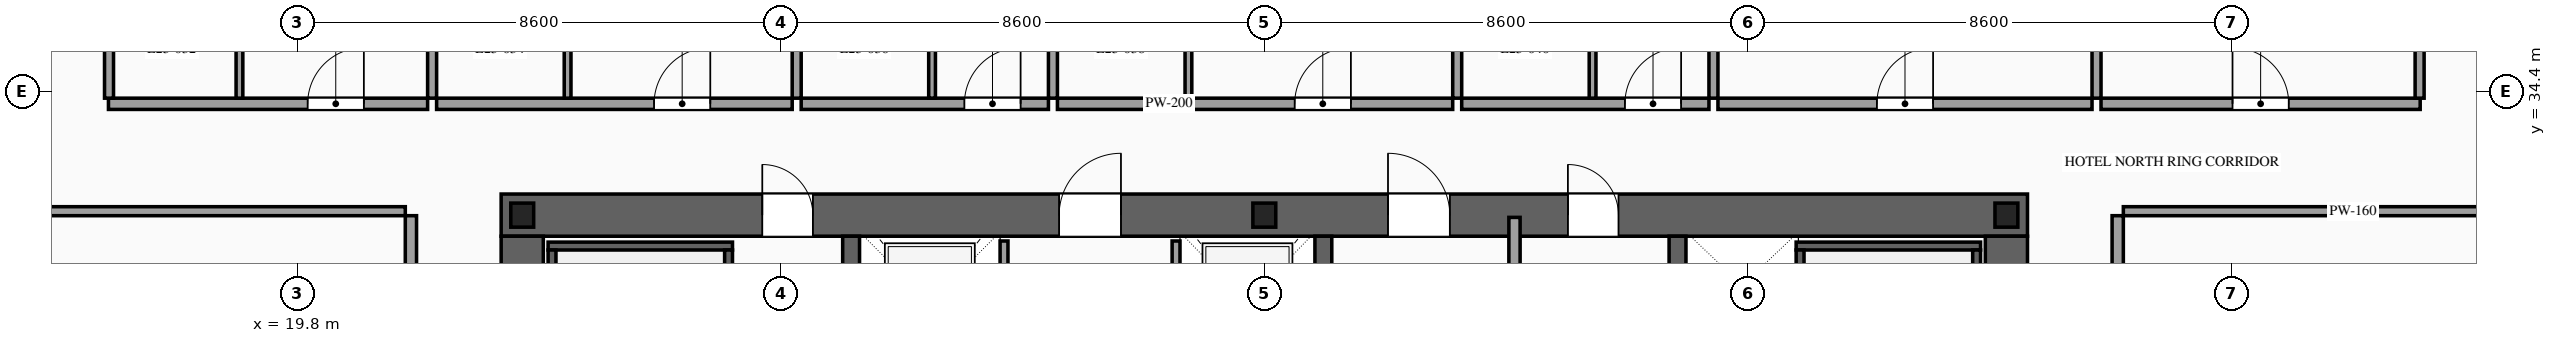
"""IFC4 building model, lengths in metres.
Left out: names, types, materials, properties, quantities, classifications, styles, units other than length and angle.
Written with IfcOpenShell. Run it as: python <this file> out.ifc"""

import sys

from ifc_helpers import new_model, si_unit, direction, frame, frame_2d, origin, origin_2d, place, context, subcontext, project, spatial, rectangle, i_section, extrude, source, transform, mapped, element, fill, save


model = new_model("IFC4")
c1 = context("Model", 3, precision=1e-05, world=origin(), true_north=direction((0.0, 1.0)))
c2 = subcontext(c1, "Body", "Model", "MODEL_VIEW")
j1 = project(units=[si_unit("LENGTHUNIT", "METRE"), si_unit("PLANEANGLEUNIT", "RADIAN")], contexts=[c1])
p1 = place(None, origin())
s1 = spatial("IfcSite", under=j1, at=p1, CompositionType="ELEMENT")
p2 = place(p1, origin())
s2 = spatial("IfcBuilding", under=s1, at=p2, CompositionType="ELEMENT")
p3 = place(p2, frame((0.0, 0.0, 97.4)))
s3 = spatial("IfcBuildingStorey", under=s2, at=p3, CompositionType="ELEMENT", Elevation=97.4)
p4 = place(p3, frame((23.425, 32.2, 0.0), z_axis=(0.0, 0.0, 1.0), x_axis=(1.0, 0.0, 0.0)))
e1 = element("IfcWall", 1, at=p4, inside=s3, PredefinedType="SHEAR", context=c2, shape_type="SweptSolid", body=[
    extrude(rectangle(XDim=27.15, YDim=0.75, at=frame_2d((13.575, 0.0))), origin(), (0.0, 0.0, 1.0), 3.6),
])
p5 = place(p4, frame((4.645, 0.0, 0.0)))
e2 = element("IfcOpeningElement", 2, at=p5, cuts=e1, PredefinedType="OPENING", context=c2, shape_type="SweptSolid", body=[
    extrude(rectangle(XDim=0.9, YDim=2.15, at=frame_2d((0.45, 1.075))), frame((0.0, 0.39, 0.0), z_axis=(0.0, -1.0, 0.0), x_axis=(1.0, 0.0, 0.0)), (0.0, 0.0, 1.0), 0.78),
])
p6 = place(p4, frame((9.925, 0.0, 0.0)))
e3 = element("IfcOpeningElement", 3, at=p6, cuts=e1, PredefinedType="OPENING", context=c2, shape_type="SweptSolid", body=[
    extrude(rectangle(XDim=1.1, YDim=2.2, at=frame_2d((0.55, 1.1))), frame((0.0, 0.39, 0.0), z_axis=(0.0, -1.0, 0.0), x_axis=(1.0, 0.0, 0.0)), (0.0, 0.0, 1.0), 0.78),
])
p7 = place(p4, frame((15.775, 0.0, 0.0)))
e4 = element("IfcOpeningElement", 4, at=p7, cuts=e1, PredefinedType="OPENING", context=c2, shape_type="SweptSolid", body=[
    extrude(rectangle(XDim=1.1, YDim=2.2, at=frame_2d((0.55, 1.1))), frame((0.0, 0.39, 0.0), z_axis=(0.0, -1.0, 0.0), x_axis=(1.0, 0.0, 0.0)), (0.0, 0.0, 1.0), 0.78),
])
p8 = place(p4, frame((18.975, 0.0, 0.0)))
e5 = element("IfcOpeningElement", 5, at=p8, cuts=e1, PredefinedType="OPENING", context=c2, shape_type="SweptSolid", body=[
    extrude(rectangle(XDim=0.9, YDim=2.15, at=frame_2d((0.45, 1.075))), frame((0.0, 0.39, 0.0), z_axis=(0.0, -1.0, 0.0), x_axis=(1.0, 0.0, 0.0)), (0.0, 0.0, 1.0), 0.78),
])
m1 = source(origin(), c2, "Body", "SweptSolid", [
    extrude(rectangle(XDim=12.05, YDim=0.75, at=frame_2d((6.025, 0.0))), origin(), (0.0, 0.0, 1.0), 3.6),
])
for number, where, z_axis, x_axis in (
    (6, (23.8, 19.775, 0.0), (0.0, 0.0, 1.0), (0.0, 1.0, 0.0)),
    (7, (50.2, 19.775, 0.0), (0.0, 0.0, 1.0), (0.0, 1.0, 0.0)),
):
    element("IfcWall", number, at=place(p3, frame(where, z_axis=z_axis, x_axis=x_axis)), inside=s3, PredefinedType="SHEAR", context=c2, shape_type="MappedRepresentation", body=[
        mapped(m1, transform((0.0, 0.0, 0.0), scale=1.0)),
    ])
m2 = source(origin(), c2, "Body", "SweptSolid", [
    extrude(rectangle(XDim=12.05, YDim=0.3, at=frame_2d((6.025, 0.0))), origin(), (0.0, 0.0, 1.0), 3.6),
])
for number, where, z_axis, x_axis in (
    (8, (29.65, 19.775, 0.0), (0.0, 0.0, 1.0), (0.0, 1.0, 0.0)),
    (9, (38.05, 19.775, 0.0), (0.0, 0.0, 1.0), (0.0, 1.0, 0.0)),
    (10, (44.35, 19.775, 0.0), (0.0, 0.0, 1.0), (0.0, 1.0, 0.0)),
):
    element("IfcWall", number, at=place(p3, frame(where, z_axis=z_axis, x_axis=x_axis)), inside=s3, PredefinedType="SOLIDWALL", context=c2, shape_type="MappedRepresentation", body=[
        mapped(m2, transform((0.0, 0.0, 0.0), scale=1.0)),
    ])
m3 = source(origin(), c2, "Body", "SweptSolid", [
    extrude(i_section(OverallWidth=0.407, OverallDepth=0.428, WebThickness=0.02, FlangeThickness=0.035, at=origin_2d()), origin(), (0.0, 0.0, 1.0), 3.6),
])
for number, where, z_axis, x_axis in (
    (11, (23.8, 32.2, 0.0), (0.0, 0.0, 1.0), (1.0, 0.0, 0.0)),
    (12, (37.0, 32.2, 0.0), (0.0, 0.0, 1.0), (1.0, 0.0, 0.0)),
    (13, (50.2, 32.2, 0.0), (0.0, 0.0, 1.0), (1.0, 0.0, 0.0)),
):
    element("IfcColumn", number, at=place(p3, frame(where, z_axis=z_axis, x_axis=x_axis)), inside=s3, PredefinedType="COLUMN", context=c2, shape_type="MappedRepresentation", body=[
        mapped(m3, transform((0.0, 0.0, 0.0), scale=1.0)),
    ])
p9 = place(p3, frame((32.37, 29.4, 0.0), z_axis=(0.0, 0.0, 1.0), x_axis=(0.0, 1.0, 0.0)))
e14 = element("IfcWall", 14, at=p9, inside=s3, PredefinedType="SOLIDWALL", context=c2, shape_type="SweptSolid", body=[
    extrude(rectangle(XDim=2.34, YDim=0.14, at=frame_2d((1.17, 0.0))), origin(), (0.0, 0.0, 1.0), 3.38),
])
p10 = place(p9, frame((0.62, 0.0, 0.0)))
e15 = element("IfcOpeningElement", 15, at=p10, cuts=e14, PredefinedType="OPENING", context=c2, shape_type="SweptSolid", body=[
    extrude(rectangle(XDim=1.1, YDim=2.2, at=frame_2d((0.55, 1.1))), frame((0.0, 0.085, 0.0), z_axis=(0.0, -1.0, 0.0), x_axis=(1.0, 0.0, 0.0)), (0.0, 0.0, 1.0), 0.17),
])
p11 = place(p3, frame((35.43, 29.4, 0.0), z_axis=(0.0, 0.0, 1.0), x_axis=(0.0, 1.0, 0.0)))
e16 = element("IfcWall", 16, at=p11, inside=s3, PredefinedType="SOLIDWALL", context=c2, shape_type="SweptSolid", body=[
    extrude(rectangle(XDim=2.34, YDim=0.14, at=frame_2d((1.17, 0.0))), origin(), (0.0, 0.0, 1.0), 3.38),
])
p12 = place(p11, frame((0.62, 0.0, 0.0)))
e17 = element("IfcOpeningElement", 17, at=p12, cuts=e16, PredefinedType="OPENING", context=c2, shape_type="SweptSolid", body=[
    extrude(rectangle(XDim=1.1, YDim=2.2, at=frame_2d((0.55, 1.1))), frame((0.0, 0.085, 0.0), z_axis=(0.0, -1.0, 0.0), x_axis=(1.0, 0.0, 0.0)), (0.0, 0.0, 1.0), 0.17),
])
m4 = source(origin(), c2, "Body", "SweptSolid", [
    extrude(rectangle(XDim=3.28, YDim=0.14, at=frame_2d((1.64, 0.0))), origin(), (0.0, 0.0, 1.0), 3.38),
])
p13 = place(p3, frame((24.26, 31.65, 0.0), z_axis=(0.0, 0.0, 1.0), x_axis=(1.0, 0.0, 0.0)))
e18 = element("IfcWall", 18, at=p13, inside=s3, PredefinedType="SOLIDWALL", context=c2, shape_type="MappedRepresentation", body=[
    mapped(m4, transform((0.0, 0.0, 0.0), scale=1.0)),
])
m5 = source(origin(), c2, "Body", "SweptSolid", [
    extrude(rectangle(XDim=8.94, YDim=0.14, at=frame_2d((4.47, 0.0))), origin(), (0.0, 0.0, 1.0), 3.38),
])
for number, where, z_axis, x_axis in (
    (19, (24.33, 22.64, 0.0), (0.0, 0.0, 1.0), (0.0, 1.0, 0.0)),
    (20, (27.47, 22.64, 0.0), (0.0, 0.0, 1.0), (0.0, 1.0, 0.0)),
):
    element("IfcWall", number, at=place(p3, frame(where, z_axis=z_axis, x_axis=x_axis)), inside=s3, PredefinedType="SOLIDWALL", context=c2, shape_type="MappedRepresentation", body=[
        mapped(m5, transform((0.0, 0.0, 0.0), scale=1.0)),
    ])
p14 = place(p3, frame((46.46, 31.65, 0.0), z_axis=(0.0, 0.0, 1.0), x_axis=(1.0, 0.0, 0.0)))
e21 = element("IfcWall", 21, at=p14, inside=s3, PredefinedType="SOLIDWALL", context=c2, shape_type="MappedRepresentation", body=[
    mapped(m4, transform((0.0, 0.0, 0.0), scale=1.0)),
])
for number, where, z_axis, x_axis in (
    (22, (46.53, 22.64, 0.0), (0.0, 0.0, 1.0), (0.0, 1.0, 0.0)),
    (23, (49.67, 22.64, 0.0), (0.0, 0.0, 1.0), (0.0, 1.0, 0.0)),
):
    element("IfcWall", number, at=place(p3, frame(where, z_axis=z_axis, x_axis=x_axis)), inside=s3, PredefinedType="SOLIDWALL", context=c2, shape_type="MappedRepresentation", body=[
        mapped(m5, transform((0.0, 0.0, 0.0), scale=1.0)),
    ])
m6 = source(origin(), c2, "Body", "SweptSolid", [
    extrude(rectangle(XDim=5.96, YDim=0.2, at=frame_2d((2.98, 0.0))), origin(), (0.0, 0.0, 1.0), 3.38),
])
p15 = place(p3, frame((41.45, 26.2, 0.0), z_axis=(0.0, 0.0, 1.0), x_axis=(0.0, 1.0, 0.0)))
e24 = element("IfcWall", 24, at=p15, inside=s3, PredefinedType="PARTITIONING", context=c2, shape_type="MappedRepresentation", body=[
    mapped(m6, transform((0.0, 0.0, 0.0), scale=1.0)),
])
p16 = place(p3, frame((16.44, 34.18, 0.0), z_axis=(0.0, 0.0, 1.0), x_axis=(1.0, 0.0, 0.0)))
e25 = element("IfcWall", 25, at=p16, inside=s3, PredefinedType="PARTITIONING", context=c2, shape_type="SweptSolid", body=[
    extrude(rectangle(XDim=5.677, YDim=0.2, at=frame_2d((2.838, 0.0))), origin(), (0.0, 0.0, 1.0), 3.38),
])
p17 = place(p16, frame((3.543, 0.0, 0.0)))
e26 = element("IfcOpeningElement", 26, at=p17, cuts=e25, PredefinedType="OPENING", context=c2, shape_type="SweptSolid", body=[
    extrude(rectangle(XDim=1.0, YDim=2.2, at=frame_2d((0.5, 1.1))), frame((0.0, 0.115, 0.0), z_axis=(0.0, -1.0, 0.0), x_axis=(1.0, 0.0, 0.0)), (0.0, 0.0, 1.0), 0.23),
])
m7 = source(origin(), c2, "Body", "SweptSolid", [
    extrude(rectangle(XDim=14.97, YDim=0.16, at=frame_2d((7.485, 0.0))), origin(), (0.0, 0.0, 1.0), 3.38),
])
p18 = place(p3, frame((22.197, 34.28, 0.0), z_axis=(0.0, 0.0, 1.0), x_axis=(0.0, 1.0, 0.0)))
e27 = element("IfcWall", 27, at=p18, inside=s3, PredefinedType="PARTITIONING", context=c2, shape_type="MappedRepresentation", body=[
    mapped(m7, transform((0.0, 0.0, 0.0), scale=1.0)),
])
m8 = source(origin(), c2, "Body", "SweptSolid", [
    extrude(rectangle(XDim=2.42, YDim=0.12, at=frame_2d((1.21, 0.0))), origin(), (0.0, 0.0, 1.0), 3.38),
])
p19 = place(p3, frame((18.77, 34.28, 0.0), z_axis=(0.0, 0.0, 1.0), x_axis=(0.0, 1.0, 0.0)))
e28 = element("IfcWall", 28, at=p19, inside=s3, PredefinedType="PARTITIONING", context=c2, shape_type="MappedRepresentation", body=[
    mapped(m8, transform((0.0, 0.0, 0.0), scale=1.0)),
])
p20 = place(p3, frame((22.277, 34.18, 0.0), z_axis=(0.0, 0.0, 1.0), x_axis=(1.0, 0.0, 0.0)))
e29 = element("IfcWall", 29, at=p20, inside=s3, PredefinedType="PARTITIONING", context=c2, shape_type="SweptSolid", body=[
    extrude(rectangle(XDim=6.325, YDim=0.2, at=frame_2d((3.163, 0.0))), origin(), (0.0, 0.0, 1.0), 3.38),
])
p21 = place(p20, frame((3.868, 0.0, 0.0)))
e30 = element("IfcOpeningElement", 30, at=p21, cuts=e29, PredefinedType="OPENING", context=c2, shape_type="SweptSolid", body=[
    extrude(rectangle(XDim=1.0, YDim=2.2, at=frame_2d((0.5, 1.1))), frame((0.0, 0.115, 0.0), z_axis=(0.0, -1.0, 0.0), x_axis=(1.0, 0.0, 0.0)), (0.0, 0.0, 1.0), 0.23),
])
p22 = place(p3, frame((28.682, 34.28, 0.0), z_axis=(0.0, 0.0, 1.0), x_axis=(0.0, 1.0, 0.0)))
e31 = element("IfcWall", 31, at=p22, inside=s3, PredefinedType="PARTITIONING", context=c2, shape_type="MappedRepresentation", body=[
    mapped(m7, transform((0.0, 0.0, 0.0), scale=1.0)),
])
p23 = place(p3, frame((24.607, 34.28, 0.0), z_axis=(0.0, 0.0, 1.0), x_axis=(0.0, 1.0, 0.0)))
e32 = element("IfcWall", 32, at=p23, inside=s3, PredefinedType="PARTITIONING", context=c2, shape_type="MappedRepresentation", body=[
    mapped(m8, transform((0.0, 0.0, 0.0), scale=1.0)),
])
p24 = place(p3, frame((28.762, 34.18, 0.0), z_axis=(0.0, 0.0, 1.0), x_axis=(1.0, 0.0, 0.0)))
e33 = element("IfcWall", 33, at=p24, inside=s3, PredefinedType="PARTITIONING", context=c2, shape_type="SweptSolid", body=[
    extrude(rectangle(XDim=4.398, YDim=0.2, at=frame_2d((2.199, 0.0))), origin(), (0.0, 0.0, 1.0), 3.38),
])
p25 = place(p24, frame((2.903, 0.0, 0.0)))
e34 = element("IfcOpeningElement", 34, at=p25, cuts=e33, PredefinedType="OPENING", context=c2, shape_type="SweptSolid", body=[
    extrude(rectangle(XDim=1.0, YDim=2.2, at=frame_2d((0.5, 1.1))), frame((0.0, 0.115, 0.0), z_axis=(0.0, -1.0, 0.0), x_axis=(1.0, 0.0, 0.0)), (0.0, 0.0, 1.0), 0.23),
])
p26 = place(p3, frame((33.24, 34.28, 0.0), z_axis=(0.0, 0.0, 1.0), x_axis=(0.0, 1.0, 0.0)))
e35 = element("IfcWall", 35, at=p26, inside=s3, PredefinedType="PARTITIONING", context=c2, shape_type="MappedRepresentation", body=[
    mapped(m7, transform((0.0, 0.0, 0.0), scale=1.0)),
])
p27 = place(p3, frame((31.09, 34.28, 0.0), z_axis=(0.0, 0.0, 1.0), x_axis=(0.0, 1.0, 0.0)))
e36 = element("IfcWall", 36, at=p27, inside=s3, PredefinedType="PARTITIONING", context=c2, shape_type="MappedRepresentation", body=[
    mapped(m8, transform((0.0, 0.0, 0.0), scale=1.0)),
])
p28 = place(p3, frame((33.32, 34.18, 0.0), z_axis=(0.0, 0.0, 1.0), x_axis=(1.0, 0.0, 0.0)))
e37 = element("IfcWall", 37, at=p28, inside=s3, PredefinedType="PARTITIONING", context=c2, shape_type="SweptSolid", body=[
    extrude(rectangle(XDim=7.031, YDim=0.2, at=frame_2d((3.516, 0.0))), origin(), (0.0, 0.0, 1.0), 3.38),
])
p29 = place(p28, frame((4.22, 0.0, 0.0)))
e38 = element("IfcOpeningElement", 38, at=p29, cuts=e37, PredefinedType="OPENING", context=c2, shape_type="SweptSolid", body=[
    extrude(rectangle(XDim=1.0, YDim=2.2, at=frame_2d((0.5, 1.1))), frame((0.0, 0.115, 0.0), z_axis=(0.0, -1.0, 0.0), x_axis=(1.0, 0.0, 0.0)), (0.0, 0.0, 1.0), 0.23),
])
p30 = place(p3, frame((40.431, 34.28, 0.0), z_axis=(0.0, 0.0, 1.0), x_axis=(0.0, 1.0, 0.0)))
e39 = element("IfcWall", 39, at=p30, inside=s3, PredefinedType="PARTITIONING", context=c2, shape_type="MappedRepresentation", body=[
    mapped(m7, transform((0.0, 0.0, 0.0), scale=1.0)),
])
p31 = place(p3, frame((35.65, 34.28, 0.0), z_axis=(0.0, 0.0, 1.0), x_axis=(0.0, 1.0, 0.0)))
e40 = element("IfcWall", 40, at=p31, inside=s3, PredefinedType="PARTITIONING", context=c2, shape_type="MappedRepresentation", body=[
    mapped(m8, transform((0.0, 0.0, 0.0), scale=1.0)),
])
p32 = place(p3, frame((40.511, 34.18, 0.0), z_axis=(0.0, 0.0, 1.0), x_axis=(1.0, 0.0, 0.0)))
e41 = element("IfcWall", 41, at=p32, inside=s3, PredefinedType="PARTITIONING", context=c2, shape_type="SweptSolid", body=[
    extrude(rectangle(XDim=4.398, YDim=0.2, at=frame_2d((2.199, 0.0))), origin(), (0.0, 0.0, 1.0), 3.38),
])
p33 = place(p32, frame((2.903, 0.0, 0.0)))
e42 = element("IfcOpeningElement", 42, at=p33, cuts=e41, PredefinedType="OPENING", context=c2, shape_type="SweptSolid", body=[
    extrude(rectangle(XDim=1.0, YDim=2.2, at=frame_2d((0.5, 1.1))), frame((0.0, 0.115, 0.0), z_axis=(0.0, -1.0, 0.0), x_axis=(1.0, 0.0, 0.0)), (0.0, 0.0, 1.0), 0.23),
])
p34 = place(p3, frame((44.989, 34.28, 0.0), z_axis=(0.0, 0.0, 1.0), x_axis=(0.0, 1.0, 0.0)))
e43 = element("IfcWall", 43, at=p34, inside=s3, PredefinedType="PARTITIONING", context=c2, shape_type="MappedRepresentation", body=[
    mapped(m7, transform((0.0, 0.0, 0.0), scale=1.0)),
])
p35 = place(p3, frame((42.839, 34.28, 0.0), z_axis=(0.0, 0.0, 1.0), x_axis=(0.0, 1.0, 0.0)))
e44 = element("IfcWall", 44, at=p35, inside=s3, PredefinedType="PARTITIONING", context=c2, shape_type="MappedRepresentation", body=[
    mapped(m8, transform((0.0, 0.0, 0.0), scale=1.0)),
])
p36 = place(p3, frame((45.069, 34.18, 0.0), z_axis=(0.0, 0.0, 1.0), x_axis=(1.0, 0.0, 0.0)))
e45 = element("IfcWall", 45, at=p36, inside=s3, PredefinedType="PARTITIONING", context=c2, shape_type="SweptSolid", body=[
    extrude(rectangle(XDim=6.654, YDim=0.2, at=frame_2d((3.327, 0.0))), origin(), (0.0, 0.0, 1.0), 3.38),
])
p37 = place(p36, frame((2.827, 0.0, 0.0)))
e46 = element("IfcOpeningElement", 46, at=p37, cuts=e45, PredefinedType="OPENING", context=c2, shape_type="SweptSolid", body=[
    extrude(rectangle(XDim=1.0, YDim=2.2, at=frame_2d((0.5, 1.1))), frame((0.0, 0.115, 0.0), z_axis=(0.0, -1.0, 0.0), x_axis=(1.0, 0.0, 0.0)), (0.0, 0.0, 1.0), 0.23),
])
p38 = place(p3, frame((51.803, 34.28, 0.0), z_axis=(0.0, 0.0, 1.0), x_axis=(0.0, 1.0, 0.0)))
e47 = element("IfcWall", 47, at=p38, inside=s3, PredefinedType="PARTITIONING", context=c2, shape_type="MappedRepresentation", body=[
    mapped(m7, transform((0.0, 0.0, 0.0), scale=1.0)),
])
p39 = place(p3, frame((51.883, 34.18, 0.0), z_axis=(0.0, 0.0, 1.0), x_axis=(1.0, 0.0, 0.0)))
e48 = element("IfcWall", 48, at=p39, inside=s3, PredefinedType="PARTITIONING", context=c2, shape_type="SweptSolid", body=[
    extrude(rectangle(XDim=5.677, YDim=0.2, at=frame_2d((2.838, 0.0))), origin(), (0.0, 0.0, 1.0), 3.38),
])
p40 = place(p39, frame((2.339, 0.0, 0.0)))
e49 = element("IfcOpeningElement", 49, at=p40, cuts=e48, PredefinedType="OPENING", context=c2, shape_type="SweptSolid", body=[
    extrude(rectangle(XDim=1.0, YDim=2.2, at=frame_2d((0.5, 1.1))), frame((0.0, 0.115, 0.0), z_axis=(0.0, -1.0, 0.0), x_axis=(1.0, 0.0, 0.0)), (0.0, 0.0, 1.0), 0.23),
])
m9 = source(origin(), c2, "Body", "SweptSolid", [
    extrude(rectangle(XDim=14.82, YDim=0.16, at=frame_2d((7.41, 0.0))), origin(), (0.0, 0.0, 1.0), 3.38),
])
for number, where, z_axis, x_axis in (
    (50, (16.45, 34.28, 0.0), (0.0, 0.0, 1.0), (0.0, 1.0, 0.0)),
    (51, (57.55, 34.28, 0.0), (0.0, 0.0, 1.0), (0.0, 1.0, 0.0)),
):
    element("IfcWall", number, at=place(p3, frame(where, z_axis=z_axis, x_axis=x_axis)), inside=s3, PredefinedType="PARTITIONING", context=c2, shape_type="MappedRepresentation", body=[
        mapped(m9, transform((0.0, 0.0, 0.0), scale=1.0)),
    ])
p41 = place(p3, frame((21.82, 25.88, 0.0), z_axis=(0.0, 0.0, 1.0), x_axis=(0.0, 1.0, 0.0)))
e52 = element("IfcWall", 52, at=p41, inside=s3, PredefinedType="PARTITIONING", context=c2, shape_type="SweptSolid", body=[
    extrude(rectangle(XDim=6.31, YDim=0.2, at=frame_2d((3.155, 0.0))), origin(), (0.0, 0.0, 1.0), 3.38),
])
p42 = place(p41, frame((3.835, 0.0, 0.0)))
e53 = element("IfcOpeningElement", 53, at=p42, cuts=e52, PredefinedType="OPENING", context=c2, shape_type="SweptSolid", body=[
    extrude(rectangle(XDim=1.0, YDim=2.2, at=frame_2d((0.5, 1.1))), frame((0.0, 0.115, 0.0), z_axis=(0.0, -1.0, 0.0), x_axis=(1.0, 0.0, 0.0)), (0.0, 0.0, 1.0), 0.23),
])
m10 = source(origin(), c2, "Body", "SweptSolid", [
    extrude(rectangle(XDim=8.17, YDim=0.16, at=frame_2d((4.085, 0.0))), origin(), (0.0, 0.0, 1.0), 2.875),
])
p43 = place(p3, frame((13.55, 32.27, 0.0), z_axis=(0.0, 0.0, 1.0), x_axis=(1.0, 0.0, 0.0)))
e54 = element("IfcWall", 54, at=p43, inside=s3, PredefinedType="PARTITIONING", context=c2, shape_type="MappedRepresentation", body=[
    mapped(m10, transform((0.0, 0.0, 0.0), scale=1.0)),
])
p44 = place(p3, frame((52.18, 25.88, 0.0), z_axis=(0.0, 0.0, 1.0), x_axis=(0.0, 1.0, 0.0)))
e55 = element("IfcWall", 55, at=p44, inside=s3, PredefinedType="PARTITIONING", context=c2, shape_type="SweptSolid", body=[
    extrude(rectangle(XDim=6.31, YDim=0.2, at=frame_2d((3.155, 0.0))), origin(), (0.0, 0.0, 1.0), 3.38),
])
p45 = place(p44, frame((3.835, 0.0, 0.0)))
e56 = element("IfcOpeningElement", 56, at=p45, cuts=e55, PredefinedType="OPENING", context=c2, shape_type="SweptSolid", body=[
    extrude(rectangle(XDim=1.0, YDim=2.2, at=frame_2d((0.5, 1.1))), frame((0.0, 0.115, 0.0), z_axis=(0.0, -1.0, 0.0), x_axis=(1.0, 0.0, 0.0)), (0.0, 0.0, 1.0), 0.23),
])
p46 = place(p3, frame((52.28, 32.27, 0.0), z_axis=(0.0, 0.0, 1.0), x_axis=(1.0, 0.0, 0.0)))
e57 = element("IfcWall", 57, at=p46, inside=s3, PredefinedType="PARTITIONING", context=c2, shape_type="MappedRepresentation", body=[
    mapped(m10, transform((0.0, 0.0, 0.0), scale=1.0)),
])
m11 = source(origin(), c2, "Body", "SweptSolid", [
    extrude(rectangle(XDim=0.9, YDim=2.15, at=frame_2d((0.45, 1.075))), frame((0.0, 0.025, 0.0), z_axis=(0.0, -1.0, 0.0), x_axis=(1.0, 0.0, 0.0)), (0.0, 0.0, 1.0), 0.05),
])
p47 = place(p5, origin())
e58 = element("IfcDoor", 58, at=p47, inside=s3, OperationType="SINGLE_SWING_LEFT", PredefinedType="DOOR", context=c2, shape_type="MappedRepresentation", body=[
    mapped(m11, transform((0.0, 0.0, 0.0), scale=1.0)),
])
fill(e2, e58)
m12 = source(origin(), c2, "Body", "SweptSolid", [
    extrude(rectangle(XDim=1.1, YDim=2.2, at=frame_2d((0.55, 1.1))), frame((0.0, 0.025, 0.0), z_axis=(0.0, -1.0, 0.0), x_axis=(1.0, 0.0, 0.0)), (0.0, 0.0, 1.0), 0.05),
])
p48 = place(p6, origin())
e59 = element("IfcDoor", 59, at=p48, inside=s3, OperationType="SINGLE_SWING_RIGHT", PredefinedType="DOOR", context=c2, shape_type="MappedRepresentation", body=[
    mapped(m12, transform((0.0, 0.0, 0.0), scale=1.0)),
])
fill(e3, e59)
p49 = place(p7, origin())
e60 = element("IfcDoor", 60, at=p49, inside=s3, OperationType="SINGLE_SWING_LEFT", PredefinedType="DOOR", context=c2, shape_type="MappedRepresentation", body=[
    mapped(m12, transform((0.0, 0.0, 0.0), scale=1.0)),
])
fill(e4, e60)
p50 = place(p8, origin())
e61 = element("IfcDoor", 61, at=p50, inside=s3, OperationType="SINGLE_SWING_LEFT", PredefinedType="DOOR", context=c2, shape_type="MappedRepresentation", body=[
    mapped(m11, transform((0.0, 0.0, 0.0), scale=1.0)),
])
fill(e5, e61)
m13 = source(origin(), c2, "Body", "SweptSolid", [
    extrude(rectangle(XDim=1.0, YDim=2.2, at=frame_2d((0.5, 1.1))), frame((0.0, 0.025, 0.0), z_axis=(0.0, -1.0, 0.0), x_axis=(1.0, 0.0, 0.0)), (0.0, 0.0, 1.0), 0.05),
])
p51 = place(p17, origin())
e62 = element("IfcDoor", 62, at=p51, inside=s3, OperationType="SINGLE_SWING_RIGHT", PredefinedType="DOOR", context=c2, shape_type="MappedRepresentation", body=[
    mapped(m13, transform((0.0, 0.0, 0.0), scale=1.0)),
])
fill(e26, e62)
p52 = place(p21, origin())
e63 = element("IfcDoor", 63, at=p52, inside=s3, OperationType="SINGLE_SWING_RIGHT", PredefinedType="DOOR", context=c2, shape_type="MappedRepresentation", body=[
    mapped(m13, transform((0.0, 0.0, 0.0), scale=1.0)),
])
fill(e30, e63)
p53 = place(p25, origin())
e64 = element("IfcDoor", 64, at=p53, inside=s3, OperationType="SINGLE_SWING_RIGHT", PredefinedType="DOOR", context=c2, shape_type="MappedRepresentation", body=[
    mapped(m13, transform((0.0, 0.0, 0.0), scale=1.0)),
])
fill(e34, e64)
p54 = place(p29, origin())
e65 = element("IfcDoor", 65, at=p54, inside=s3, OperationType="SINGLE_SWING_RIGHT", PredefinedType="DOOR", context=c2, shape_type="MappedRepresentation", body=[
    mapped(m13, transform((0.0, 0.0, 0.0), scale=1.0)),
])
fill(e38, e65)
p55 = place(p33, origin())
e66 = element("IfcDoor", 66, at=p55, inside=s3, OperationType="SINGLE_SWING_RIGHT", PredefinedType="DOOR", context=c2, shape_type="MappedRepresentation", body=[
    mapped(m13, transform((0.0, 0.0, 0.0), scale=1.0)),
])
fill(e42, e66)
p56 = place(p37, origin())
e67 = element("IfcDoor", 67, at=p56, inside=s3, OperationType="SINGLE_SWING_RIGHT", PredefinedType="DOOR", context=c2, shape_type="MappedRepresentation", body=[
    mapped(m13, transform((0.0, 0.0, 0.0), scale=1.0)),
])
fill(e46, e67)
p57 = place(p40, origin())
e68 = element("IfcDoor", 68, at=p57, inside=s3, OperationType="SINGLE_SWING_LEFT", PredefinedType="DOOR", context=c2, shape_type="MappedRepresentation", body=[
    mapped(m13, transform((0.0, 0.0, 0.0), scale=1.0)),
])
fill(e49, e68)
save(model, sys.argv[1])
